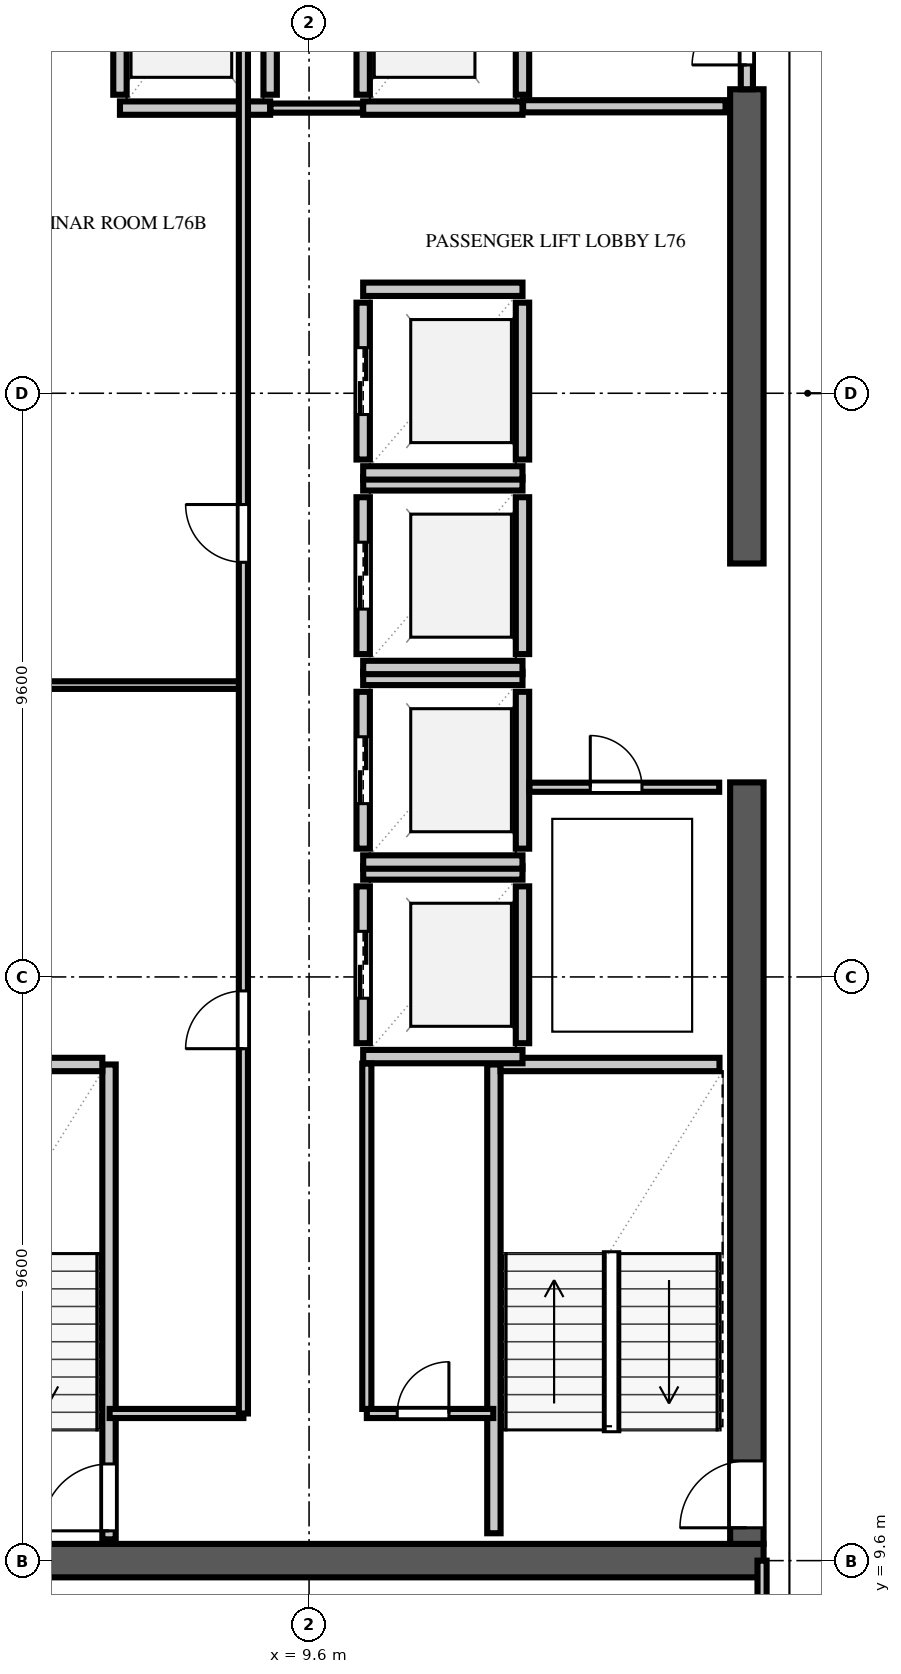
"""IFC4 building model, lengths in metres.
Left out: names, types, materials, properties, quantities, classifications, styles, units other than length and angle.
Written with IfcOpenShell. Run it as: python <this file> out.ifc"""

import sys

from ifc_helpers import new_model, si_unit, direction, frame, frame_2d, origin, place, context, subcontext, project, spatial, rectangle, extrude, element, fill, save


model = new_model("IFC4")
c1 = context("Model", 3, precision=1e-05, world=origin(), true_north=direction((0.0, 1.0)))
c2 = subcontext(c1, "Body", "Model", "MODEL_VIEW")
j1 = project(units=[si_unit("LENGTHUNIT", "METRE"), si_unit("PLANEANGLEUNIT", "RADIAN")], contexts=[c1])
p1 = place(None, origin())
s1 = spatial("IfcSite", under=j1, at=p1, CompositionType="ELEMENT")
p2 = place(p1, origin())
s2 = spatial("IfcBuilding", under=s1, at=p2, CompositionType="ELEMENT")
p3 = place(p2, frame((0.0, 0.0, 300.0)))
s3 = spatial("IfcBuildingStorey", under=s2, at=p3, CompositionType="ELEMENT", Elevation=300.0)
p4 = place(p3, frame((2.475, 9.6, 0.0), z_axis=(0.0, 0.0, 1.0), x_axis=(1.0, 0.0, 0.0)))
e1 = element("IfcWall", 1, at=p4, inside=s3, PredefinedType="SHEAR", context=c2, shape_type="SweptSolid", body=[
    extrude(rectangle(XDim=14.6, YDim=0.55, at=frame_2d((7.3, 0.0))), origin(), (0.0, 0.0, 1.0), 3.54),
])
p5 = place(p3, frame((16.8, 9.875, 0.0), z_axis=(0.0, 0.0, 1.0), x_axis=(0.0, 1.0, 0.0)))
e2 = element("IfcWall", 2, at=p5, inside=s3, PredefinedType="SHEAR", context=c2, shape_type="SweptSolid", body=[
    extrude(rectangle(XDim=12.525, YDim=0.55, at=frame_2d((6.262, 0.0))), origin(), (0.0, 0.0, 1.0), 3.54),
])
p6 = place(p5, frame((0.265, 0.0, 0.0)))
e3 = element("IfcOpeningElement", 3, at=p6, cuts=e2, PredefinedType="OPENING", context=c2, shape_type="SweptSolid", body=[
    extrude(rectangle(XDim=1.1, YDim=2.2, at=frame_2d((0.55, 1.1))), frame((0.0, 0.287, 0.0), z_axis=(0.0, -1.0, 0.0), x_axis=(1.0, 0.0, 0.0)), (0.0, 0.0, 1.0), 0.574),
])
p7 = place(p3, frame((16.8, 26.0, 0.0), z_axis=(0.0, 0.0, 1.0), x_axis=(0.0, 1.0, 0.0)))
e4 = element("IfcWall", 4, at=p7, inside=s3, PredefinedType="SHEAR", context=c2, shape_type="SweptSolid", body=[
    extrude(rectangle(XDim=7.8, YDim=0.55, at=frame_2d((3.9, 0.0))), origin(), (0.0, 0.0, 1.0), 3.54),
])
p8 = place(p3, frame((6.31, 9.95, 0.0), z_axis=(0.0, 0.0, 1.0), x_axis=(0.0, 1.0, 0.0)))
e5 = element("IfcWall", 5, at=p8, inside=s3, PredefinedType="SOLIDWALL", context=c2, shape_type="SweptSolid", body=[
    extrude(rectangle(XDim=7.81, YDim=0.22, at=frame_2d((3.905, 0.0))), origin(), (0.0, 0.0, 1.0), 3.54),
])
p9 = place(p8, frame((0.14, 0.0, 0.0)))
e6 = element("IfcOpeningElement", 6, at=p9, cuts=e5, PredefinedType="OPENING", context=c2, shape_type="SweptSolid", body=[
    extrude(rectangle(XDim=1.1, YDim=2.2, at=frame_2d((0.55, 1.1))), frame((0.0, 0.122, 0.0), z_axis=(0.0, -1.0, 0.0), x_axis=(1.0, 0.0, 0.0)), (0.0, 0.0, 1.0), 0.244),
])
p10 = place(p3, frame((2.65, 17.76, 0.0), z_axis=(0.0, 0.0, 1.0), x_axis=(1.0, 0.0, 0.0)))
e7 = element("IfcWall", 7, at=p10, inside=s3, PredefinedType="SOLIDWALL", context=c2, shape_type="SweptSolid", body=[
    extrude(rectangle(XDim=3.55, YDim=0.22, at=frame_2d((1.775, 0.0))), origin(), (0.0, 0.0, 1.0), 3.54),
])
p11 = place(p3, frame((12.64, 10.05, 0.0), z_axis=(0.0, 0.0, 1.0), x_axis=(0.0, 1.0, 0.0)))
e8 = element("IfcWall", 8, at=p11, inside=s3, PredefinedType="SOLIDWALL", context=c2, shape_type="SweptSolid", body=[
    extrude(rectangle(XDim=7.71, YDim=0.22, at=frame_2d((3.855, 0.0))), origin(), (0.0, 0.0, 1.0), 3.54),
])
p12 = place(p3, frame((12.75, 17.76, 0.0), z_axis=(0.0, 0.0, 1.0), x_axis=(1.0, 0.0, 0.0)))
e9 = element("IfcWall", 9, at=p12, inside=s3, PredefinedType="SOLIDWALL", context=c2, shape_type="SweptSolid", body=[
    extrude(rectangle(XDim=3.6, YDim=0.22, at=frame_2d((1.8, 0.0))), origin(), (0.0, 0.0, 1.0), 3.54),
])
p13 = place(p3, frame((10.49, 18.11, 0.0), z_axis=(0.0, 0.0, 1.0), x_axis=(0.0, 1.0, 0.0)))
e10 = element("IfcWall", 10, at=p13, inside=s3, PredefinedType="SOLIDWALL", context=c2, shape_type="SweptSolid", body=[
    extrude(rectangle(XDim=2.58, YDim=0.22, at=frame_2d((1.29, 0.0))), origin(), (0.0, 0.0, 1.0), 3.54),
])
p14 = place(p13, frame((0.74, 0.0, 0.0)))
e11 = element("IfcOpeningElement", 11, at=p14, cuts=e10, PredefinedType="OPENING", context=c2, shape_type="SweptSolid", body=[
    extrude(rectangle(XDim=1.1, YDim=2.2, at=frame_2d((0.55, 1.1))), frame((0.0, 0.122, 0.0), z_axis=(0.0, -1.0, 0.0), x_axis=(1.0, 0.0, 0.0)), (0.0, 0.0, 1.0), 0.244),
])
p15 = place(p3, frame((13.11, 18.11, 0.0), z_axis=(0.0, 0.0, 1.0), x_axis=(0.0, 1.0, 0.0)))
e12 = element("IfcWall", 12, at=p15, inside=s3, PredefinedType="SOLIDWALL", context=c2, shape_type="SweptSolid", body=[
    extrude(rectangle(XDim=2.58, YDim=0.22, at=frame_2d((1.29, 0.0))), origin(), (0.0, 0.0, 1.0), 3.54),
])
for number, where, z_axis, x_axis in (
    (13, (10.49, 17.89, 0.0), (0.0, 0.0, 1.0), (1.0, 0.0, 0.0)),
    (14, (10.49, 20.91, 0.0), (0.0, 0.0, 1.0), (1.0, 0.0, 0.0)),
):
    element("IfcWall", number, at=place(p3, frame(where, z_axis=z_axis, x_axis=x_axis)), inside=s3, PredefinedType="SOLIDWALL", context=c2, shape_type="SweptSolid", body=[
        extrude(rectangle(XDim=2.62, YDim=0.22, at=frame_2d((1.31, 0.0))), origin(), (0.0, 0.0, 1.0), 3.54),
    ])
p16 = place(p3, frame((10.49, 21.31, 0.0), z_axis=(0.0, 0.0, 1.0), x_axis=(0.0, 1.0, 0.0)))
e15 = element("IfcWall", 15, at=p16, inside=s3, PredefinedType="SOLIDWALL", context=c2, shape_type="SweptSolid", body=[
    extrude(rectangle(XDim=2.58, YDim=0.22, at=frame_2d((1.29, 0.0))), origin(), (0.0, 0.0, 1.0), 3.54),
])
p17 = place(p16, frame((0.74, 0.0, 0.0)))
e16 = element("IfcOpeningElement", 16, at=p17, cuts=e15, PredefinedType="OPENING", context=c2, shape_type="SweptSolid", body=[
    extrude(rectangle(XDim=1.1, YDim=2.2, at=frame_2d((0.55, 1.1))), frame((0.0, 0.122, 0.0), z_axis=(0.0, -1.0, 0.0), x_axis=(1.0, 0.0, 0.0)), (0.0, 0.0, 1.0), 0.244),
])
p18 = place(p3, frame((13.11, 21.31, 0.0), z_axis=(0.0, 0.0, 1.0), x_axis=(0.0, 1.0, 0.0)))
e17 = element("IfcWall", 17, at=p18, inside=s3, PredefinedType="SOLIDWALL", context=c2, shape_type="SweptSolid", body=[
    extrude(rectangle(XDim=2.58, YDim=0.22, at=frame_2d((1.29, 0.0))), origin(), (0.0, 0.0, 1.0), 3.54),
])
for number, where, z_axis, x_axis in (
    (18, (10.49, 21.09, 0.0), (0.0, 0.0, 1.0), (1.0, 0.0, 0.0)),
    (19, (10.49, 24.11, 0.0), (0.0, 0.0, 1.0), (1.0, 0.0, 0.0)),
):
    element("IfcWall", number, at=place(p3, frame(where, z_axis=z_axis, x_axis=x_axis)), inside=s3, PredefinedType="SOLIDWALL", context=c2, shape_type="SweptSolid", body=[
        extrude(rectangle(XDim=2.62, YDim=0.22, at=frame_2d((1.31, 0.0))), origin(), (0.0, 0.0, 1.0), 3.54),
    ])
p19 = place(p3, frame((10.49, 24.51, 0.0), z_axis=(0.0, 0.0, 1.0), x_axis=(0.0, 1.0, 0.0)))
e20 = element("IfcWall", 20, at=p19, inside=s3, PredefinedType="SOLIDWALL", context=c2, shape_type="SweptSolid", body=[
    extrude(rectangle(XDim=2.58, YDim=0.22, at=frame_2d((1.29, 0.0))), origin(), (0.0, 0.0, 1.0), 3.54),
])
p20 = place(p19, frame((0.74, 0.0, 0.0)))
e21 = element("IfcOpeningElement", 21, at=p20, cuts=e20, PredefinedType="OPENING", context=c2, shape_type="SweptSolid", body=[
    extrude(rectangle(XDim=1.1, YDim=2.2, at=frame_2d((0.55, 1.1))), frame((0.0, 0.122, 0.0), z_axis=(0.0, -1.0, 0.0), x_axis=(1.0, 0.0, 0.0)), (0.0, 0.0, 1.0), 0.244),
])
p21 = place(p3, frame((13.11, 24.51, 0.0), z_axis=(0.0, 0.0, 1.0), x_axis=(0.0, 1.0, 0.0)))
e22 = element("IfcWall", 22, at=p21, inside=s3, PredefinedType="SOLIDWALL", context=c2, shape_type="SweptSolid", body=[
    extrude(rectangle(XDim=2.58, YDim=0.22, at=frame_2d((1.29, 0.0))), origin(), (0.0, 0.0, 1.0), 3.54),
])
for number, where, z_axis, x_axis in (
    (23, (10.49, 24.29, 0.0), (0.0, 0.0, 1.0), (1.0, 0.0, 0.0)),
    (24, (10.49, 27.31, 0.0), (0.0, 0.0, 1.0), (1.0, 0.0, 0.0)),
):
    element("IfcWall", number, at=place(p3, frame(where, z_axis=z_axis, x_axis=x_axis)), inside=s3, PredefinedType="SOLIDWALL", context=c2, shape_type="SweptSolid", body=[
        extrude(rectangle(XDim=2.62, YDim=0.22, at=frame_2d((1.31, 0.0))), origin(), (0.0, 0.0, 1.0), 3.54),
    ])
p22 = place(p3, frame((10.49, 27.71, 0.0), z_axis=(0.0, 0.0, 1.0), x_axis=(0.0, 1.0, 0.0)))
e25 = element("IfcWall", 25, at=p22, inside=s3, PredefinedType="SOLIDWALL", context=c2, shape_type="SweptSolid", body=[
    extrude(rectangle(XDim=2.58, YDim=0.22, at=frame_2d((1.29, 0.0))), origin(), (0.0, 0.0, 1.0), 3.54),
])
p23 = place(p22, frame((0.74, 0.0, 0.0)))
e26 = element("IfcOpeningElement", 26, at=p23, cuts=e25, PredefinedType="OPENING", context=c2, shape_type="SweptSolid", body=[
    extrude(rectangle(XDim=1.1, YDim=2.2, at=frame_2d((0.55, 1.1))), frame((0.0, 0.122, 0.0), z_axis=(0.0, -1.0, 0.0), x_axis=(1.0, 0.0, 0.0)), (0.0, 0.0, 1.0), 0.244),
])
p24 = place(p3, frame((13.11, 27.71, 0.0), z_axis=(0.0, 0.0, 1.0), x_axis=(0.0, 1.0, 0.0)))
e27 = element("IfcWall", 27, at=p24, inside=s3, PredefinedType="SOLIDWALL", context=c2, shape_type="SweptSolid", body=[
    extrude(rectangle(XDim=2.58, YDim=0.22, at=frame_2d((1.29, 0.0))), origin(), (0.0, 0.0, 1.0), 3.54),
])
for number, where, z_axis, x_axis in (
    (28, (10.49, 27.49, 0.0), (0.0, 0.0, 1.0), (1.0, 0.0, 0.0)),
    (29, (10.49, 30.51, 0.0), (0.0, 0.0, 1.0), (1.0, 0.0, 0.0)),
):
    element("IfcWall", number, at=place(p3, frame(where, z_axis=z_axis, x_axis=x_axis)), inside=s3, PredefinedType="SOLIDWALL", context=c2, shape_type="SweptSolid", body=[
        extrude(rectangle(XDim=2.62, YDim=0.22, at=frame_2d((1.31, 0.0))), origin(), (0.0, 0.0, 1.0), 3.54),
    ])
for number, where, z_axis, x_axis in (
    (30, (6.49, 33.71, 0.0), (0.0, 0.0, 1.0), (0.0, 1.0, 0.0)),
    (31, (8.96, 33.71, 0.0), (0.0, 0.0, 1.0), (0.0, 1.0, 0.0)),
):
    element("IfcWall", number, at=place(p3, frame(where, z_axis=z_axis, x_axis=x_axis)), inside=s3, PredefinedType="SOLIDWALL", context=c2, shape_type="SweptSolid", body=[
        extrude(rectangle(XDim=2.78, YDim=0.22, at=frame_2d((1.39, 0.0))), origin(), (0.0, 0.0, 1.0), 3.54),
    ])
p25 = place(p3, frame((6.49, 33.49, 0.0), z_axis=(0.0, 0.0, 1.0), x_axis=(1.0, 0.0, 0.0)))
e32 = element("IfcWall", 32, at=p25, inside=s3, PredefinedType="SOLIDWALL", context=c2, shape_type="SweptSolid", body=[
    extrude(rectangle(XDim=2.47, YDim=0.22, at=frame_2d((1.235, 0.0))), origin(), (0.0, 0.0, 1.0), 3.54),
])
for number, where, z_axis, x_axis in (
    (33, (10.49, 33.71, 0.0), (0.0, 0.0, 1.0), (0.0, 1.0, 0.0)),
    (34, (13.11, 33.71, 0.0), (0.0, 0.0, 1.0), (0.0, 1.0, 0.0)),
):
    element("IfcWall", number, at=place(p3, frame(where, z_axis=z_axis, x_axis=x_axis)), inside=s3, PredefinedType="SOLIDWALL", context=c2, shape_type="SweptSolid", body=[
        extrude(rectangle(XDim=2.78, YDim=0.22, at=frame_2d((1.39, 0.0))), origin(), (0.0, 0.0, 1.0), 3.54),
    ])
p26 = place(p3, frame((10.49, 33.49, 0.0), z_axis=(0.0, 0.0, 1.0), x_axis=(1.0, 0.0, 0.0)))
e35 = element("IfcWall", 35, at=p26, inside=s3, PredefinedType="SOLIDWALL", context=c2, shape_type="SweptSolid", body=[
    extrude(rectangle(XDim=2.62, YDim=0.22, at=frame_2d((1.31, 0.0))), origin(), (0.0, 0.0, 1.0), 3.54),
])
p27 = place(p3, frame((13.12, 33.52, 0.0), z_axis=(0.0, 0.0, 1.0), x_axis=(1.0, 0.0, 0.0)))
e36 = element("IfcWall", 36, at=p27, inside=s3, PredefinedType="SOLIDWALL", context=c2, shape_type="SweptSolid", body=[
    extrude(rectangle(XDim=3.33, YDim=0.2, at=frame_2d((1.665, 0.0))), origin(), (0.0, 0.0, 1.0), 3.54),
])
p28 = place(p3, frame((16.8, 33.8, 0.0), z_axis=(0.0, 0.0, 1.0), x_axis=(0.0, 1.0, 0.0)))
e37 = element("IfcWall", 37, at=p28, inside=s3, PredefinedType="SOLIDWALL", context=c2, shape_type="SweptSolid", body=[
    extrude(rectangle(XDim=2.6, YDim=0.2, at=frame_2d((1.3, 0.0))), origin(), (0.0, 0.0, 1.0), 3.54),
])
p29 = place(p28, frame((0.4, 0.0, 0.0)))
e38 = element("IfcOpeningElement", 38, at=p29, cuts=e37, PredefinedType="OPENING", context=c2, shape_type="SweptSolid", body=[
    extrude(rectangle(XDim=1.8, YDim=2.2, at=frame_2d((0.9, 1.1))), frame((0.0, 0.112, 0.0), z_axis=(0.0, -1.0, 0.0), x_axis=(1.0, 0.0, 0.0)), (0.0, 0.0, 1.0), 0.224),
])
p30 = place(p3, frame((8.965, 33.49, 0.0), z_axis=(0.0, 0.0, 1.0), x_axis=(1.0, 0.0, 0.0)))
e39 = element("IfcWall", 39, at=p30, inside=s3, PredefinedType="PARTITIONING", context=c2, shape_type="SweptSolid", body=[
    extrude(rectangle(XDim=1.52, YDim=0.15, at=frame_2d((0.76, 0.0))), origin(), (0.0, 0.0, 1.0), 3.54),
])
p31 = place(p3, frame((10.55, 12.02, 0.0), z_axis=(0.0, 0.0, 1.0), x_axis=(1.0, 0.0, 0.0)))
e40 = element("IfcWall", 40, at=p31, inside=s3, PredefinedType="PARTITIONING", context=c2, shape_type="SweptSolid", body=[
    extrude(rectangle(XDim=2.08, YDim=0.15, at=frame_2d((1.04, 0.0))), origin(), (0.0, 0.0, 1.0), 3.54),
])
p32 = place(p31, frame((0.5, 0.0, 0.0)))
e41 = element("IfcOpeningElement", 41, at=p32, cuts=e40, PredefinedType="OPENING", context=c2, shape_type="SweptSolid", body=[
    extrude(rectangle(XDim=0.85, YDim=2.1, at=frame_2d((0.425, 1.05))), frame((0.0, 0.087, 0.0), z_axis=(0.0, -1.0, 0.0), x_axis=(1.0, 0.0, 0.0)), (0.0, 0.0, 1.0), 0.174),
])
p33 = place(p3, frame((10.55, 12.095, 0.0), z_axis=(0.0, 0.0, 1.0), x_axis=(0.0, 1.0, 0.0)))
e42 = element("IfcWall", 42, at=p33, inside=s3, PredefinedType="PARTITIONING", context=c2, shape_type="SweptSolid", body=[
    extrude(rectangle(XDim=5.68, YDim=0.15, at=frame_2d((2.84, 0.0))), origin(), (0.0, 0.0, 1.0), 3.54),
])
p34 = place(p3, frame((13.225, 22.32, 0.0), z_axis=(0.0, 0.0, 1.0), x_axis=(1.0, 0.0, 0.0)))
e43 = element("IfcWall", 43, at=p34, inside=s3, PredefinedType="PARTITIONING", context=c2, shape_type="SweptSolid", body=[
    extrude(rectangle(XDim=3.12, YDim=0.15, at=frame_2d((1.56, 0.0))), origin(), (0.0, 0.0, 1.0), 3.54),
])
p35 = place(p34, frame((1.0, 0.0, 0.0)))
e44 = element("IfcOpeningElement", 44, at=p35, cuts=e43, PredefinedType="OPENING", context=c2, shape_type="SweptSolid", body=[
    extrude(rectangle(XDim=0.85, YDim=2.1, at=frame_2d((0.425, 1.05))), frame((0.0, 0.087, 0.0), z_axis=(0.0, -1.0, 0.0), x_axis=(1.0, 0.0, 0.0)), (0.0, 0.0, 1.0), 0.174),
])
p36 = place(p3, frame((6.32, 12.02, 0.0), z_axis=(0.0, 0.0, 1.0), x_axis=(1.0, 0.0, 0.0)))
e45 = element("IfcWall", 45, at=p36, inside=s3, PredefinedType="PARTITIONING", context=c2, shape_type="SweptSolid", body=[
    extrude(rectangle(XDim=2.2, YDim=0.15, at=frame_2d((1.1, 0.0))), origin(), (0.0, 0.0, 1.0), 3.54),
])
p37 = place(p3, frame((2.65, 24.0, 0.0), z_axis=(0.0, 0.0, 1.0), x_axis=(1.0, 0.0, 0.0)))
e46 = element("IfcWall", 46, at=p37, inside=s3, PredefinedType="PARTITIONING", context=c2, shape_type="SweptSolid", body=[
    extrude(rectangle(XDim=5.87, YDim=0.125, at=frame_2d((2.935, 0.0))), origin(), (0.0, 0.0, 1.0), 3.54),
])
p38 = place(p3, frame((8.52, 12.02, 0.0), z_axis=(0.0, 0.0, 1.0), x_axis=(0.0, 1.0, 0.0)))
e47 = element("IfcWall", 47, at=p38, inside=s3, PredefinedType="PARTITIONING", context=c2, shape_type="SweptSolid", body=[
    extrude(rectangle(XDim=24.76, YDim=0.15, at=frame_2d((12.38, 0.0))), origin(), (0.0, 0.0, 1.0), 3.54),
])
p39 = place(p38, frame((6.0, 0.0, 0.0)))
e48 = element("IfcOpeningElement", 48, at=p39, cuts=e47, PredefinedType="OPENING", context=c2, shape_type="SweptSolid", body=[
    extrude(rectangle(XDim=0.95, YDim=2.15, at=frame_2d((0.475, 1.075))), frame((0.0, 0.087, 0.0), z_axis=(0.0, -1.0, 0.0), x_axis=(1.0, 0.0, 0.0)), (0.0, 0.0, 1.0), 0.174),
])
p40 = place(p38, frame((14.0, 0.0, 0.0)))
e49 = element("IfcOpeningElement", 49, at=p40, cuts=e47, PredefinedType="OPENING", context=c2, shape_type="SweptSolid", body=[
    extrude(rectangle(XDim=0.95, YDim=2.15, at=frame_2d((0.475, 1.075))), frame((0.0, 0.087, 0.0), z_axis=(0.0, -1.0, 0.0), x_axis=(1.0, 0.0, 0.0)), (0.0, 0.0, 1.0), 0.174),
])
p41 = place(p3, frame((17.05, 0.22, 0.0), z_axis=(0.0, 0.0, 1.0), x_axis=(0.0, 1.0, 0.0)))
e50 = element("IfcWall", 50, at=p41, inside=s3, PredefinedType="PARTITIONING", context=c2, shape_type="SweptSolid", body=[
    extrude(rectangle(XDim=9.38, YDim=0.15, at=frame_2d((4.69, 0.0))), origin(), (0.0, 0.0, 1.0), 3.54),
])
p42 = place(p41, frame((5.58, 0.0, 0.0)))
e51 = element("IfcOpeningElement", 51, at=p42, cuts=e50, PredefinedType="OPENING", context=c2, shape_type="SweptSolid", body=[
    extrude(rectangle(XDim=1.2, YDim=2.2, at=frame_2d((0.6, 1.1))), frame((0.0, 0.087, 0.0), z_axis=(0.0, -1.0, 0.0), x_axis=(1.0, 0.0, 0.0)), (0.0, 0.0, 1.0), 0.174),
])
p43 = place(p9, origin())
e52 = element("IfcDoor", 52, at=p43, inside=s3, OperationType="SINGLE_SWING_LEFT", PredefinedType="DOOR", context=c2, shape_type="SweptSolid", body=[
    extrude(rectangle(XDim=1.1, YDim=2.2, at=frame_2d((0.55, 1.1))), frame((0.0, 0.025, 0.0), z_axis=(0.0, -1.0, 0.0), x_axis=(1.0, 0.0, 0.0)), (0.0, 0.0, 1.0), 0.05),
])
fill(e6, e52)
p44 = place(p6, origin())
e53 = element("IfcDoor", 53, at=p44, inside=s3, OperationType="SINGLE_SWING_LEFT", PredefinedType="DOOR", context=c2, shape_type="SweptSolid", body=[
    extrude(rectangle(XDim=1.1, YDim=2.2, at=frame_2d((0.55, 1.1))), frame((0.0, 0.025, 0.0), z_axis=(0.0, -1.0, 0.0), x_axis=(1.0, 0.0, 0.0)), (0.0, 0.0, 1.0), 0.05),
])
fill(e3, e53)
p45 = place(p14, origin())
e54 = element("IfcDoor", 54, at=p45, inside=s3, OperationType="DOUBLE_DOOR_SLIDING", PredefinedType="DOOR", context=c2, shape_type="SweptSolid", body=[
    extrude(rectangle(XDim=1.1, YDim=2.2, at=frame_2d((0.55, 1.1))), frame((0.0, 0.025, 0.0), z_axis=(0.0, -1.0, 0.0), x_axis=(1.0, 0.0, 0.0)), (0.0, 0.0, 1.0), 0.05),
])
fill(e11, e54)
p46 = place(p17, origin())
e55 = element("IfcDoor", 55, at=p46, inside=s3, OperationType="DOUBLE_DOOR_SLIDING", PredefinedType="DOOR", context=c2, shape_type="SweptSolid", body=[
    extrude(rectangle(XDim=1.1, YDim=2.2, at=frame_2d((0.55, 1.1))), frame((0.0, 0.025, 0.0), z_axis=(0.0, -1.0, 0.0), x_axis=(1.0, 0.0, 0.0)), (0.0, 0.0, 1.0), 0.05),
])
fill(e16, e55)
p47 = place(p20, origin())
e56 = element("IfcDoor", 56, at=p47, inside=s3, OperationType="DOUBLE_DOOR_SLIDING", PredefinedType="DOOR", context=c2, shape_type="SweptSolid", body=[
    extrude(rectangle(XDim=1.1, YDim=2.2, at=frame_2d((0.55, 1.1))), frame((0.0, 0.025, 0.0), z_axis=(0.0, -1.0, 0.0), x_axis=(1.0, 0.0, 0.0)), (0.0, 0.0, 1.0), 0.05),
])
fill(e21, e56)
p48 = place(p23, origin())
e57 = element("IfcDoor", 57, at=p48, inside=s3, OperationType="DOUBLE_DOOR_SLIDING", PredefinedType="DOOR", context=c2, shape_type="SweptSolid", body=[
    extrude(rectangle(XDim=1.1, YDim=2.2, at=frame_2d((0.55, 1.1))), frame((0.0, 0.025, 0.0), z_axis=(0.0, -1.0, 0.0), x_axis=(1.0, 0.0, 0.0)), (0.0, 0.0, 1.0), 0.05),
])
fill(e26, e57)
p49 = place(p29, origin())
e58 = element("IfcDoor", 58, at=p49, inside=s3, OperationType="DOUBLE_DOOR_SINGLE_SWING", PredefinedType="DOOR", context=c2, shape_type="SweptSolid", body=[
    extrude(rectangle(XDim=1.8, YDim=2.2, at=frame_2d((0.9, 1.1))), frame((0.0, 0.025, 0.0), z_axis=(0.0, -1.0, 0.0), x_axis=(1.0, 0.0, 0.0)), (0.0, 0.0, 1.0), 0.05),
])
fill(e38, e58)
p50 = place(p32, origin())
e59 = element("IfcDoor", 59, at=p50, inside=s3, OperationType="SINGLE_SWING_RIGHT", PredefinedType="DOOR", context=c2, shape_type="SweptSolid", body=[
    extrude(rectangle(XDim=0.85, YDim=2.1, at=frame_2d((0.425, 1.05))), frame((0.0, 0.025, 0.0), z_axis=(0.0, -1.0, 0.0), x_axis=(1.0, 0.0, 0.0)), (0.0, 0.0, 1.0), 0.05),
])
fill(e41, e59)
p51 = place(p35, origin())
e60 = element("IfcDoor", 60, at=p51, inside=s3, OperationType="SINGLE_SWING_LEFT", PredefinedType="DOOR", context=c2, shape_type="SweptSolid", body=[
    extrude(rectangle(XDim=0.85, YDim=2.1, at=frame_2d((0.425, 1.05))), frame((0.0, 0.025, 0.0), z_axis=(0.0, -1.0, 0.0), x_axis=(1.0, 0.0, 0.0)), (0.0, 0.0, 1.0), 0.05),
])
fill(e44, e60)
p52 = place(p39, origin())
e61 = element("IfcDoor", 61, at=p52, inside=s3, OperationType="SINGLE_SWING_LEFT", PredefinedType="DOOR", context=c2, shape_type="SweptSolid", body=[
    extrude(rectangle(XDim=0.95, YDim=2.15, at=frame_2d((0.475, 1.075))), frame((0.0, 0.025, 0.0), z_axis=(0.0, -1.0, 0.0), x_axis=(1.0, 0.0, 0.0)), (0.0, 0.0, 1.0), 0.05),
])
fill(e48, e61)
p53 = place(p40, origin())
e62 = element("IfcDoor", 62, at=p53, inside=s3, OperationType="SINGLE_SWING_RIGHT", PredefinedType="DOOR", context=c2, shape_type="SweptSolid", body=[
    extrude(rectangle(XDim=0.95, YDim=2.15, at=frame_2d((0.475, 1.075))), frame((0.0, 0.025, 0.0), z_axis=(0.0, -1.0, 0.0), x_axis=(1.0, 0.0, 0.0)), (0.0, 0.0, 1.0), 0.05),
])
fill(e49, e62)
save(model, sys.argv[1])
